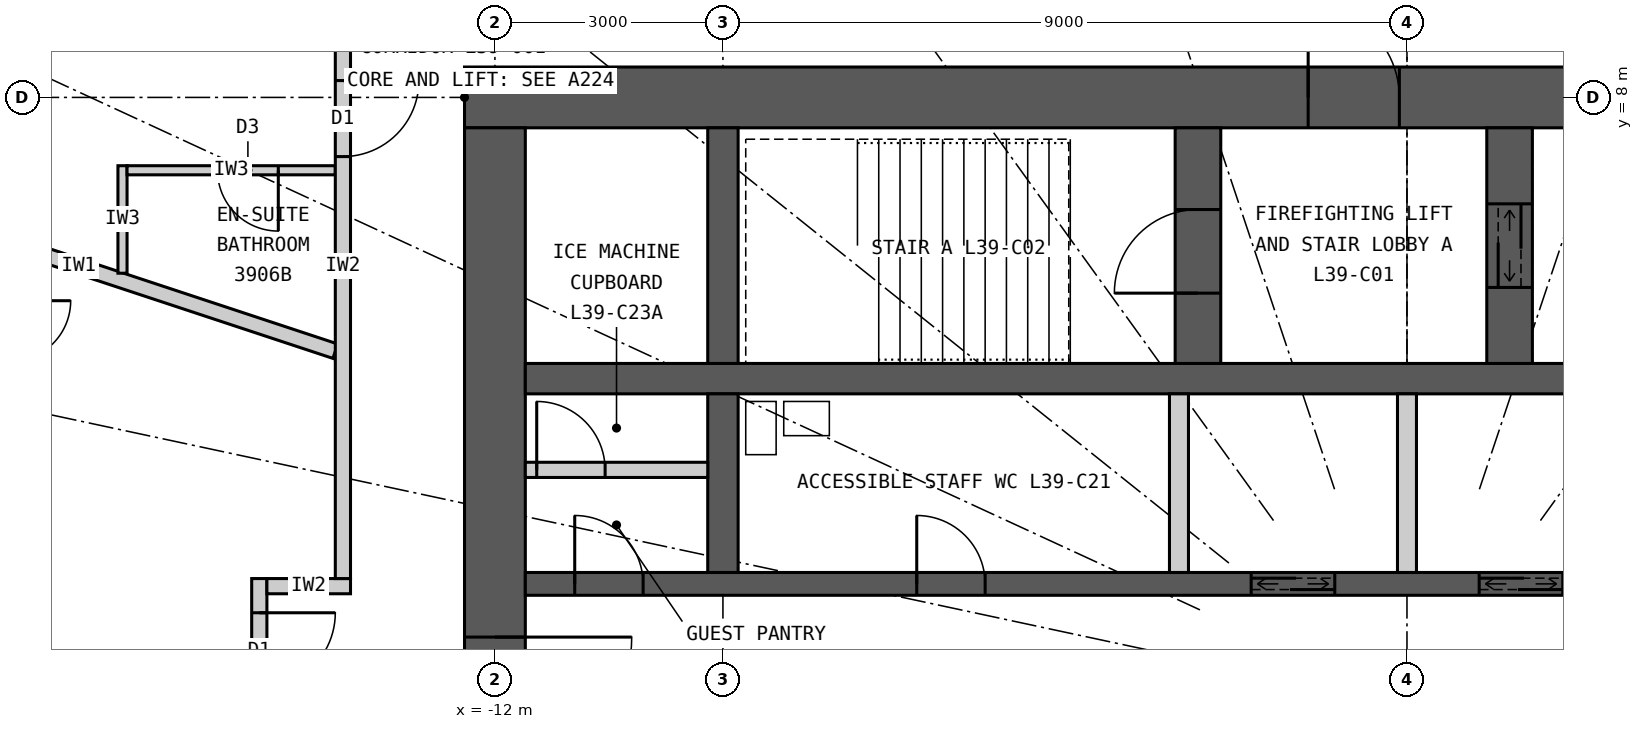
"""IFC4 building model, lengths in metres.
Left out: names, types, materials, properties, quantities, classifications, styles, units other than length and angle.
Written with IfcOpenShell. Run it as: python <this file> out.ifc"""

import sys

from ifc_helpers import new_model, si_unit, direction, frame, frame_2d, origin, place, context, subcontext, project, spatial, rectangle, extrude, element, fill, save


model = new_model("IFC4")
c1 = context("Model", 3, precision=1e-05, world=origin(), true_north=direction((0.0, 1.0)))
c2 = subcontext(c1, "Body", "Model", "MODEL_VIEW")
j1 = project(units=[si_unit("LENGTHUNIT", "METRE"), si_unit("PLANEANGLEUNIT", "RADIAN")], contexts=[c1])
p1 = place(None, origin())
s1 = spatial("IfcSite", under=j1, at=p1, CompositionType="ELEMENT")
p2 = place(p1, origin())
s2 = spatial("IfcBuilding", under=s1, at=p2, CompositionType="ELEMENT")
p3 = place(p2, frame((0.0, 0.0, 150.0)))
s3 = spatial("IfcBuildingStorey", under=s2, at=p3, CompositionType="ELEMENT", Elevation=150.0)
p4 = place(p3, frame((-12.4, 8.0, 0.0), z_axis=(0.0, 0.0, 1.0), x_axis=(1.0, 0.0, 0.0)))
e1 = element("IfcWall", 1, at=p4, inside=s3, PredefinedType="SHEAR", context=c2, shape_type="SweptSolid", body=[
    extrude(rectangle(XDim=24.8, YDim=0.8, at=frame_2d((12.4, 0.0))), origin(), (0.0, 0.0, 1.0), 3.3),
])
p5 = place(p4, frame((11.1, 0.0, 0.0)))
e2 = element("IfcOpeningElement", 2, at=p5, cuts=e1, PredefinedType="OPENING", context=c2, shape_type="SweptSolid", body=[
    extrude(rectangle(XDim=1.2, YDim=2.2, at=frame_2d((0.6, 1.1))), frame((0.0, 0.41, 0.0), z_axis=(0.0, -1.0, 0.0), x_axis=(1.0, 0.0, 0.0)), (0.0, 0.0, 1.0), 0.82),
])
p6 = place(p4, frame((18.7, 0.0, 0.0)))
e3 = element("IfcOpeningElement", 3, at=p6, cuts=e1, PredefinedType="OPENING", context=c2, shape_type="SweptSolid", body=[
    extrude(rectangle(XDim=0.9, YDim=2.2, at=frame_2d((0.45, 1.1))), frame((0.0, 0.41, 0.0), z_axis=(0.0, -1.0, 0.0), x_axis=(1.0, 0.0, 0.0)), (0.0, 0.0, 1.0), 0.82),
])
p7 = place(p3, frame((-12.0, 7.6, 0.0), z_axis=(0.0, 0.0, 1.0), x_axis=(0.0, -1.0, 0.0)))
e4 = element("IfcWall", 4, at=p7, inside=s3, PredefinedType="SHEAR", context=c2, shape_type="SweptSolid", body=[
    extrude(rectangle(XDim=15.2, YDim=0.8, at=frame_2d((7.6, 0.0))), origin(), (0.0, 0.0, 1.0), 3.3),
])
p8 = place(p7, frame((6.7, 0.0, 0.0)))
e5 = element("IfcOpeningElement", 5, at=p8, cuts=e4, PredefinedType="OPENING", context=c2, shape_type="SweptSolid", body=[
    extrude(rectangle(XDim=1.8, YDim=2.2, at=frame_2d((0.9, 1.1))), frame((0.0, 0.41, 0.0), z_axis=(0.0, -1.0, 0.0), x_axis=(1.0, 0.0, 0.0)), (0.0, 0.0, 1.0), 0.82),
])
p9 = place(p3, frame((-11.6, 4.3, 0.0), z_axis=(0.0, 0.0, 1.0), x_axis=(1.0, 0.0, 0.0)))
e6 = element("IfcWall", 6, at=p9, inside=s3, PredefinedType="SHEAR", context=c2, shape_type="SweptSolid", body=[
    extrude(rectangle(XDim=23.2, YDim=0.4, at=frame_2d((11.6, 0.0))), origin(), (0.0, 0.0, 1.0), 3.3),
])
p10 = place(p3, frame((-11.6, 1.6, 0.0), z_axis=(0.0, 0.0, 1.0), x_axis=(1.0, 0.0, 0.0)))
e7 = element("IfcWall", 7, at=p10, inside=s3, PredefinedType="SHEAR", context=c2, shape_type="SweptSolid", body=[
    extrude(rectangle(XDim=23.2, YDim=0.3, at=frame_2d((11.6, 0.0))), origin(), (0.0, 0.0, 1.0), 3.3),
])
p11 = place(p10, frame((9.55, 0.0, 0.0)))
e8 = element("IfcOpeningElement", 8, at=p11, cuts=e7, PredefinedType="OPENING", context=c2, shape_type="SweptSolid", body=[
    extrude(rectangle(XDim=1.1, YDim=2.2, at=frame_2d((0.55, 1.1))), frame((0.0, 0.16, 0.0), z_axis=(0.0, -1.0, 0.0), x_axis=(1.0, 0.0, 0.0)), (0.0, 0.0, 1.0), 0.32),
])
p12 = place(p10, frame((12.55, 0.0, 0.0)))
e9 = element("IfcOpeningElement", 9, at=p12, cuts=e7, PredefinedType="OPENING", context=c2, shape_type="SweptSolid", body=[
    extrude(rectangle(XDim=1.1, YDim=2.2, at=frame_2d((0.55, 1.1))), frame((0.0, 0.16, 0.0), z_axis=(0.0, -1.0, 0.0), x_axis=(1.0, 0.0, 0.0)), (0.0, 0.0, 1.0), 0.32),
])
p13 = place(p10, frame((5.15, 0.0, 0.0)))
e10 = element("IfcOpeningElement", 10, at=p13, cuts=e7, PredefinedType="OPENING", context=c2, shape_type="SweptSolid", body=[
    extrude(rectangle(XDim=0.9, YDim=2.2, at=frame_2d((0.45, 1.1))), frame((0.0, 0.16, 0.0), z_axis=(0.0, -1.0, 0.0), x_axis=(1.0, 0.0, 0.0)), (0.0, 0.0, 1.0), 0.32),
])
p14 = place(p10, frame((21.65, 0.0, 0.0)))
e11 = element("IfcOpeningElement", 11, at=p14, cuts=e7, PredefinedType="OPENING", context=c2, shape_type="SweptSolid", body=[
    extrude(rectangle(XDim=0.9, YDim=2.2, at=frame_2d((0.45, 1.1))), frame((0.0, 0.16, 0.0), z_axis=(0.0, -1.0, 0.0), x_axis=(1.0, 0.0, 0.0)), (0.0, 0.0, 1.0), 0.32),
])
p15 = place(p10, frame((0.65, 0.0, 0.0)))
e12 = element("IfcOpeningElement", 12, at=p15, cuts=e7, PredefinedType="OPENING", context=c2, shape_type="SweptSolid", body=[
    extrude(rectangle(XDim=0.9, YDim=2.2, at=frame_2d((0.45, 1.1))), frame((0.0, 0.16, 0.0), z_axis=(0.0, -1.0, 0.0), x_axis=(1.0, 0.0, 0.0)), (0.0, 0.0, 1.0), 0.32),
])
p16 = place(p3, frame((-9.0, 4.5, 0.0), z_axis=(0.0, 0.0, 1.0), x_axis=(0.0, 1.0, 0.0)))
e13 = element("IfcWall", 13, at=p16, inside=s3, PredefinedType="SHEAR", context=c2, shape_type="SweptSolid", body=[
    extrude(rectangle(XDim=3.1, YDim=0.4, at=frame_2d((1.55, 0.0))), origin(), (0.0, 0.0, 1.0), 3.3),
])
p17 = place(p3, frame((-9.0, 1.75, 0.0), z_axis=(0.0, 0.0, 1.0), x_axis=(0.0, 1.0, 0.0)))
e14 = element("IfcWall", 14, at=p17, inside=s3, PredefinedType="SHEAR", context=c2, shape_type="SweptSolid", body=[
    extrude(rectangle(XDim=2.35, YDim=0.4, at=frame_2d((1.175, 0.0))), origin(), (0.0, 0.0, 1.0), 3.3),
])
p18 = place(p3, frame((-2.75, 4.5, 0.0), z_axis=(0.0, 0.0, 1.0), x_axis=(0.0, 1.0, 0.0)))
e15 = element("IfcWall", 15, at=p18, inside=s3, PredefinedType="SHEAR", context=c2, shape_type="SweptSolid", body=[
    extrude(rectangle(XDim=3.1, YDim=0.6, at=frame_2d((1.55, 0.0))), origin(), (0.0, 0.0, 1.0), 3.3),
])
p19 = place(p18, frame((0.925, 0.0, 0.0)))
e16 = element("IfcOpeningElement", 16, at=p19, cuts=e15, PredefinedType="OPENING", context=c2, shape_type="SweptSolid", body=[
    extrude(rectangle(XDim=1.1, YDim=2.2, at=frame_2d((0.55, 1.1))), frame((0.0, 0.31, 0.0), z_axis=(0.0, -1.0, 0.0), x_axis=(1.0, 0.0, 0.0)), (0.0, 0.0, 1.0), 0.62),
])
p20 = place(p3, frame((1.35, 4.5, 0.0), z_axis=(0.0, 0.0, 1.0), x_axis=(0.0, 1.0, 0.0)))
e17 = element("IfcWall", 17, at=p20, inside=s3, PredefinedType="SHEAR", context=c2, shape_type="SweptSolid", body=[
    extrude(rectangle(XDim=3.1, YDim=0.6, at=frame_2d((1.55, 0.0))), origin(), (0.0, 0.0, 1.0), 3.3),
])
p21 = place(p20, frame((1.0, 0.0, 0.0)))
e18 = element("IfcOpeningElement", 18, at=p21, cuts=e17, PredefinedType="OPENING", context=c2, shape_type="SweptSolid", body=[
    extrude(rectangle(XDim=1.1, YDim=2.2, at=frame_2d((0.55, 1.1))), frame((0.0, 0.31, 0.0), z_axis=(0.0, -1.0, 0.0), x_axis=(1.0, 0.0, 0.0)), (0.0, 0.0, 1.0), 0.62),
])
for number, where, z_axis, x_axis in (
    (19, (-3.0, 1.75, 0.0), (0.0, 0.0, 1.0), (0.0, 1.0, 0.0)),
    (20, (0.0, 1.75, 0.0), (0.0, 0.0, 1.0), (0.0, 1.0, 0.0)),
):
    element("IfcWall", number, at=place(p3, frame(where, z_axis=z_axis, x_axis=x_axis)), inside=s3, PredefinedType="PARTITIONING", context=c2, shape_type="SweptSolid", body=[
        extrude(rectangle(XDim=2.35, YDim=0.25, at=frame_2d((1.175, 0.0))), origin(), (0.0, 0.0, 1.0), 3.3),
    ])
p22 = place(p3, frame((-14.1, 4.661, 0.0), z_axis=(0.0, 0.0, 1.0), x_axis=(-0.949453216399, 0.313908569285, 0.0)))
e21 = element("IfcWall", 21, at=p22, inside=s3, PredefinedType="PARTITIONING", context=c2, shape_type="SweptSolid", body=[
    extrude(rectangle(XDim=7.109, YDim=0.2, at=frame_2d((3.554, 0.0))), origin(), (0.0, 0.0, 1.0), 3.12),
])
p23 = place(p3, frame((-15.1, 1.67, 0.0), z_axis=(0.0, 0.0, 1.0), x_axis=(0.0, -1.0, 0.0)))
e22 = element("IfcWall", 22, at=p23, inside=s3, PredefinedType="PARTITIONING", context=c2, shape_type="SweptSolid", body=[
    extrude(rectangle(XDim=3.34, YDim=0.2, at=frame_2d((1.67, 0.0))), origin(), (0.0, 0.0, 1.0), 3.12),
])
p24 = place(p23, frame((0.45, 0.0, 0.0)))
e23 = element("IfcOpeningElement", 23, at=p24, cuts=e22, PredefinedType="OPENING", context=c2, shape_type="SweptSolid", body=[
    extrude(rectangle(XDim=1.0, YDim=2.2, at=frame_2d((0.5, 1.1))), frame((0.0, 0.11, 0.0), z_axis=(0.0, -1.0, 0.0), x_axis=(1.0, 0.0, 0.0)), (0.0, 0.0, 1.0), 0.22),
])
p25 = place(p23, frame((1.89, 0.0, 0.0)))
e24 = element("IfcOpeningElement", 24, at=p25, cuts=e22, PredefinedType="OPENING", context=c2, shape_type="SweptSolid", body=[
    extrude(rectangle(XDim=1.0, YDim=2.2, at=frame_2d((0.5, 1.1))), frame((0.0, 0.11, 0.0), z_axis=(0.0, -1.0, 0.0), x_axis=(1.0, 0.0, 0.0)), (0.0, 0.0, 1.0), 0.22),
])
p26 = place(p3, frame((-13.9, 1.57, 0.0), z_axis=(0.0, 0.0, 1.0), x_axis=(-1.0, 0.0, 0.0)))
e25 = element("IfcWall", 25, at=p26, inside=s3, PredefinedType="PARTITIONING", context=c2, shape_type="SweptSolid", body=[
    extrude(rectangle(XDim=1.1, YDim=0.2, at=frame_2d((0.55, 0.0))), origin(), (0.0, 0.0, 1.0), 2.47),
])
p27 = place(p3, frame((-16.9, 5.687, 0.0), z_axis=(0.0, 0.0, 1.0), x_axis=(0.0, 1.0, 0.0)))
e26 = element("IfcWall", 26, at=p27, inside=s3, PredefinedType="PARTITIONING", context=c2, shape_type="SweptSolid", body=[
    extrude(rectangle(XDim=1.414, YDim=0.12, at=frame_2d((0.707, 0.0))), origin(), (0.0, 0.0, 1.0), 3.12),
])
p28 = place(p3, frame((-14.1, 7.042, 0.0), z_axis=(0.0, 0.0, 1.0), x_axis=(-1.0, 0.0, 0.0)))
e27 = element("IfcWall", 27, at=p28, inside=s3, PredefinedType="PARTITIONING", context=c2, shape_type="SweptSolid", body=[
    extrude(rectangle(XDim=2.74, YDim=0.12, at=frame_2d((1.37, 0.0))), origin(), (0.0, 0.0, 1.0), 3.12),
])
p29 = place(p28, frame((0.75, 0.0, 0.0)))
e28 = element("IfcOpeningElement", 28, at=p29, cuts=e27, PredefinedType="OPENING", context=c2, shape_type="SweptSolid", body=[
    extrude(rectangle(XDim=0.8, YDim=2.1, at=frame_2d((0.4, 1.05))), frame((0.0, 0.07, 0.0), z_axis=(0.0, -1.0, 0.0), x_axis=(1.0, 0.0, 0.0)), (0.0, 0.0, 1.0), 0.14),
])
p30 = place(p3, frame((-14.0, 9.9, 0.0), z_axis=(0.0, 0.0, 1.0), x_axis=(0.0, -1.0, 0.0)))
e29 = element("IfcWall", 29, at=p30, inside=s3, PredefinedType="PARTITIONING", context=c2, shape_type="SweptSolid", body=[
    extrude(rectangle(XDim=8.23, YDim=0.2, at=frame_2d((4.115, 0.0))), origin(), (0.0, 0.0, 1.0), 3.12),
])
p31 = place(p30, frame((1.678, 0.0, 0.0)))
e30 = element("IfcOpeningElement", 30, at=p31, cuts=e29, PredefinedType="OPENING", context=c2, shape_type="SweptSolid", body=[
    extrude(rectangle(XDim=1.0, YDim=2.2, at=frame_2d((0.5, 1.1))), frame((0.0, 0.11, 0.0), z_axis=(0.0, -1.0, 0.0), x_axis=(1.0, 0.0, 0.0)), (0.0, 0.0, 1.0), 0.22),
])
p32 = place(p3, frame((-11.6, 3.1, 0.0), z_axis=(0.0, 0.0, 1.0), x_axis=(1.0, 0.0, 0.0)))
e31 = element("IfcWall", 31, at=p32, inside=s3, PredefinedType="PARTITIONING", context=c2, shape_type="SweptSolid", body=[
    extrude(rectangle(XDim=2.4, YDim=0.2, at=frame_2d((1.2, 0.0))), origin(), (0.0, 0.0, 1.0), 3.12),
])
p33 = place(p32, frame((0.15, 0.0, 0.0)))
e32 = element("IfcOpeningElement", 32, at=p33, cuts=e31, PredefinedType="OPENING", context=c2, shape_type="SweptSolid", body=[
    extrude(rectangle(XDim=0.9, YDim=2.2, at=frame_2d((0.45, 1.1))), frame((0.0, 0.11, 0.0), z_axis=(0.0, -1.0, 0.0), x_axis=(1.0, 0.0, 0.0)), (0.0, 0.0, 1.0), 0.22),
])
p34 = place(p29, origin())
e33 = element("IfcDoor", 33, at=p34, inside=s3, OperationType="SINGLE_SWING_LEFT", PredefinedType="DOOR", context=c2, shape_type="SweptSolid", body=[
    extrude(rectangle(XDim=0.8, YDim=2.1, at=frame_2d((0.4, 1.05))), frame((0.0, 0.025, 0.0), z_axis=(0.0, -1.0, 0.0), x_axis=(1.0, 0.0, 0.0)), (0.0, 0.0, 1.0), 0.05),
])
fill(e28, e33)
p35 = place(p31, origin())
e34 = element("IfcDoor", 34, at=p35, inside=s3, OperationType="SINGLE_SWING_LEFT", PredefinedType="DOOR", context=c2, shape_type="SweptSolid", body=[
    extrude(rectangle(XDim=1.0, YDim=2.2, at=frame_2d((0.5, 1.1))), frame((0.0, 0.025, 0.0), z_axis=(0.0, -1.0, 0.0), x_axis=(1.0, 0.0, 0.0)), (0.0, 0.0, 1.0), 0.05),
])
fill(e30, e34)
p36 = place(p24, origin())
e35 = element("IfcDoor", 35, at=p36, inside=s3, OperationType="SINGLE_SWING_LEFT", PredefinedType="DOOR", context=c2, shape_type="SweptSolid", body=[
    extrude(rectangle(XDim=1.0, YDim=2.2, at=frame_2d((0.5, 1.1))), frame((0.0, 0.025, 0.0), z_axis=(0.0, -1.0, 0.0), x_axis=(1.0, 0.0, 0.0)), (0.0, 0.0, 1.0), 0.05),
])
fill(e23, e35)
p37 = place(p5, origin())
e36 = element("IfcDoor", 36, at=p37, inside=s3, OperationType="SINGLE_SWING_LEFT", PredefinedType="DOOR", context=c2, shape_type="SweptSolid", body=[
    extrude(rectangle(XDim=1.2, YDim=2.2, at=frame_2d((0.6, 1.1))), frame((0.0, 0.025, 0.0), z_axis=(0.0, -1.0, 0.0), x_axis=(1.0, 0.0, 0.0)), (0.0, 0.0, 1.0), 0.05),
])
fill(e2, e36)
p38 = place(p19, origin())
e37 = element("IfcDoor", 37, at=p38, inside=s3, OperationType="SINGLE_SWING_LEFT", PredefinedType="DOOR", context=c2, shape_type="SweptSolid", body=[
    extrude(rectangle(XDim=1.1, YDim=2.2, at=frame_2d((0.55, 1.1))), frame((0.0, 0.025, 0.0), z_axis=(0.0, -1.0, 0.0), x_axis=(1.0, 0.0, 0.0)), (0.0, 0.0, 1.0), 0.05),
])
fill(e16, e37)
p39 = place(p21, origin())
e38 = element("IfcDoor", 38, at=p39, inside=s3, OperationType="DOUBLE_DOOR_SLIDING", PredefinedType="DOOR", context=c2, shape_type="SweptSolid", body=[
    extrude(rectangle(XDim=1.1, YDim=2.2, at=frame_2d((0.55, 1.1))), frame((0.0, 0.025, 0.0), z_axis=(0.0, -1.0, 0.0), x_axis=(1.0, 0.0, 0.0)), (0.0, 0.0, 1.0), 0.05),
])
fill(e18, e38)
p40 = place(p11, origin())
e39 = element("IfcDoor", 39, at=p40, inside=s3, OperationType="DOUBLE_DOOR_SLIDING", PredefinedType="DOOR", context=c2, shape_type="SweptSolid", body=[
    extrude(rectangle(XDim=1.1, YDim=2.2, at=frame_2d((0.55, 1.1))), frame((0.0, 0.025, 0.0), z_axis=(0.0, -1.0, 0.0), x_axis=(1.0, 0.0, 0.0)), (0.0, 0.0, 1.0), 0.05),
])
fill(e8, e39)
p41 = place(p12, origin())
e40 = element("IfcDoor", 40, at=p41, inside=s3, OperationType="DOUBLE_DOOR_SLIDING", PredefinedType="DOOR", context=c2, shape_type="SweptSolid", body=[
    extrude(rectangle(XDim=1.1, YDim=2.2, at=frame_2d((0.55, 1.1))), frame((0.0, 0.025, 0.0), z_axis=(0.0, -1.0, 0.0), x_axis=(1.0, 0.0, 0.0)), (0.0, 0.0, 1.0), 0.05),
])
fill(e9, e40)
p42 = place(p13, origin())
e41 = element("IfcDoor", 41, at=p42, inside=s3, OperationType="SINGLE_SWING_LEFT", PredefinedType="DOOR", context=c2, shape_type="SweptSolid", body=[
    extrude(rectangle(XDim=0.9, YDim=2.2, at=frame_2d((0.45, 1.1))), frame((0.0, 0.025, 0.0), z_axis=(0.0, -1.0, 0.0), x_axis=(1.0, 0.0, 0.0)), (0.0, 0.0, 1.0), 0.05),
])
fill(e10, e41)
p43 = place(p15, origin())
e42 = element("IfcDoor", 42, at=p43, inside=s3, OperationType="SINGLE_SWING_LEFT", PredefinedType="DOOR", context=c2, shape_type="SweptSolid", body=[
    extrude(rectangle(XDim=0.9, YDim=2.2, at=frame_2d((0.45, 1.1))), frame((0.0, 0.025, 0.0), z_axis=(0.0, -1.0, 0.0), x_axis=(1.0, 0.0, 0.0)), (0.0, 0.0, 1.0), 0.05),
])
fill(e12, e42)
p44 = place(p33, origin())
e43 = element("IfcDoor", 43, at=p44, inside=s3, OperationType="SINGLE_SWING_LEFT", PredefinedType="DOOR", context=c2, shape_type="SweptSolid", body=[
    extrude(rectangle(XDim=0.9, YDim=2.2, at=frame_2d((0.45, 1.1))), frame((0.0, 0.025, 0.0), z_axis=(0.0, -1.0, 0.0), x_axis=(1.0, 0.0, 0.0)), (0.0, 0.0, 1.0), 0.05),
])
fill(e32, e43)
p45 = place(p8, origin())
e44 = element("IfcDoor", 44, at=p45, inside=s3, OperationType="DOUBLE_DOOR_DOUBLE_SWING", PredefinedType="DOOR", context=c2, shape_type="SweptSolid", body=[
    extrude(rectangle(XDim=1.8, YDim=2.2, at=frame_2d((0.9, 1.1))), frame((0.0, 0.025, 0.0), z_axis=(0.0, -1.0, 0.0), x_axis=(1.0, 0.0, 0.0)), (0.0, 0.0, 1.0), 0.05),
])
fill(e5, e44)
save(model, sys.argv[1])
